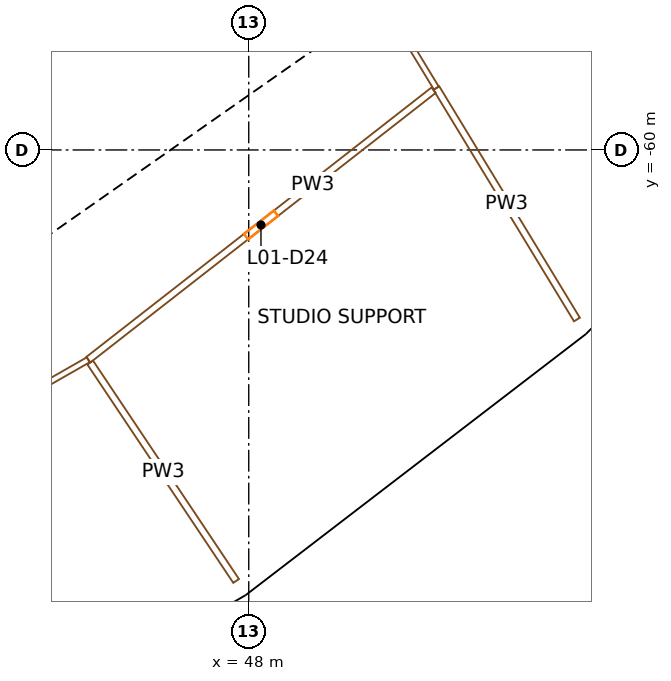
"""IFC4 building model, lengths in metres.
Left out: names, types, materials, properties, quantities, classifications, styles, units other than length and angle.
Written with IfcOpenShell. Run it as: python <this file> out.ifc"""

import sys

from ifc_helpers import new_model, si_unit, direction, frame, frame_2d, origin, origin_2d, place, context, subcontext, project, spatial, rectangle, extrude, element, fill, save


model = new_model("IFC4")
c1 = context("Model", 3, precision=1e-05, world=origin(), true_north=direction((0.0, 1.0)))
c2 = subcontext(c1, "Body", "Model", "MODEL_VIEW")
j1 = project(units=[si_unit("LENGTHUNIT", "METRE"), si_unit("PLANEANGLEUNIT", "RADIAN")], contexts=[c1])
p1 = place(None, origin())
s1 = spatial("IfcSite", under=j1, at=p1, CompositionType="ELEMENT")
p2 = place(p1, origin())
s2 = spatial("IfcBuilding", under=s1, at=p2, CompositionType="ELEMENT")
p3 = place(p2, frame((0.0, 0.0, 9.0)))
s3 = spatial("IfcBuildingStorey", under=s2, at=p3, CompositionType="ELEMENT", Elevation=9.0)
p4 = place(p3, frame((43.196, -64.647, 0.0), z_axis=(0.0, 0.0, 1.0), x_axis=(0.831469612303, 0.55557023302, 0.0)))
e1 = element("IfcColumn", 1, at=p4, inside=s3, PredefinedType="COLUMN", context=c2, shape_type="SweptSolid", body=[
    extrude(rectangle(XDim=1.4, YDim=1.8, at=origin_2d()), origin(), (0.0, 0.0, 1.0), 9.0),
])
p5 = place(p3, frame((47.362, -70.883, 0.0), z_axis=(0.0, 0.0, 1.0), x_axis=(0.831469612303, 0.55557023302, 0.0)))
e2 = element("IfcColumn", 2, at=p5, inside=s3, PredefinedType="COLUMN", context=c2, shape_type="SweptSolid", body=[
    extrude(rectangle(XDim=1.1, YDim=1.3, at=origin_2d()), origin(), (0.0, 0.0, 1.0), 9.0),
])
p6 = place(p3, frame((51.264, -58.456, 0.0), z_axis=(0.0, 0.0, 1.0), x_axis=(0.751839807479, 0.6593458151, 0.0)))
e3 = element("IfcColumn", 3, at=p6, inside=s3, PredefinedType="COLUMN", context=c2, shape_type="SweptSolid", body=[
    extrude(rectangle(XDim=1.4, YDim=1.8, at=origin_2d()), origin(), (0.0, 0.0, 1.0), 9.0),
])
p7 = place(p3, frame((56.209, -64.094, 0.0), z_axis=(0.0, 0.0, 1.0), x_axis=(0.751839807479, 0.6593458151, 0.0)))
e4 = element("IfcColumn", 4, at=p7, inside=s3, PredefinedType="COLUMN", context=c2, shape_type="SweptSolid", body=[
    extrude(rectangle(XDim=1.1, YDim=1.3, at=origin_2d()), origin(), (0.0, 0.0, 1.0), 9.0),
])
p8 = place(p3, frame((49.779, -57.191, 0.0), z_axis=(0.0, 0.0, 1.0), x_axis=(-0.573577477574, 0.819151315216, 0.0)))
e5 = element("IfcWall", 5, at=p8, inside=s3, PredefinedType="SHEAR", context=c2, shape_type="SweptSolid", body=[
    extrude(rectangle(XDim=14.8, YDim=0.9, at=frame_2d((7.4, 0.0))), origin(), (0.0, 0.0, 1.0), 8.6),
])
p9 = place(p8, frame((6.7, 0.0, 0.0)))
e6 = element("IfcOpeningElement", 6, at=p9, cuts=e5, PredefinedType="OPENING", context=c2, shape_type="SweptSolid", body=[
    extrude(rectangle(XDim=1.4, YDim=2.1, at=frame_2d((0.7, 1.05))), frame((0.0, 0.46, 0.0), z_axis=(0.0, -1.0, 0.0), x_axis=(1.0, 0.0, 0.0)), (0.0, 0.0, 1.0), 0.92),
])
p10 = place(p3, frame((36.827, -65.71, 0.0), z_axis=(0.0, 0.0, 1.0), x_axis=(0.819153391756, 0.573574511963, 0.0)))
e7 = element("IfcWall", 7, at=p10, inside=s3, PredefinedType="SHEAR", context=c2, shape_type="SweptSolid", body=[
    extrude(rectangle(XDim=15.045, YDim=0.9, at=frame_2d((7.523, 0.0))), origin(), (0.0, 0.0, 1.0), 8.6),
])
p11 = place(p10, frame((0.8, 0.0, 0.0)))
e8 = element("IfcOpeningElement", 8, at=p11, cuts=e7, PredefinedType="OPENING", context=c2, shape_type="SweptSolid", body=[
    extrude(rectangle(XDim=1.0, YDim=2.1, at=frame_2d((0.5, 1.05))), frame((0.0, 0.46, 0.0), z_axis=(0.0, -1.0, 0.0), x_axis=(1.0, 0.0, 0.0)), (0.0, 0.0, 1.0), 0.92),
])
p12 = place(p10, frame((3.475, 0.0, 0.0)))
e9 = element("IfcOpeningElement", 9, at=p12, cuts=e7, PredefinedType="OPENING", context=c2, shape_type="SweptSolid", body=[
    extrude(rectangle(XDim=1.0, YDim=2.1, at=frame_2d((0.5, 1.05))), frame((0.0, 0.46, 0.0), z_axis=(0.0, -1.0, 0.0), x_axis=(1.0, 0.0, 0.0)), (0.0, 0.0, 1.0), 0.92),
])
p13 = place(p10, frame((6.175, 0.0, 0.0)))
e10 = element("IfcOpeningElement", 10, at=p13, cuts=e7, PredefinedType="OPENING", context=c2, shape_type="SweptSolid", body=[
    extrude(rectangle(XDim=1.0, YDim=2.1, at=frame_2d((0.5, 1.05))), frame((0.0, 0.46, 0.0), z_axis=(0.0, -1.0, 0.0), x_axis=(1.0, 0.0, 0.0)), (0.0, 0.0, 1.0), 0.92),
])
p14 = place(p10, frame((13.495, 0.0, 0.0)))
e11 = element("IfcOpeningElement", 11, at=p14, cuts=e7, PredefinedType="OPENING", context=c2, shape_type="SweptSolid", body=[
    extrude(rectangle(XDim=1.1, YDim=2.1, at=frame_2d((0.55, 1.05))), frame((0.0, 0.46, 0.0), z_axis=(0.0, -1.0, 0.0), x_axis=(1.0, 0.0, 0.0)), (0.0, 0.0, 1.0), 0.92),
])
p15 = place(p3, frame((43.204, -60.696, 0.0), z_axis=(0.0, 0.0, 1.0), x_axis=(-0.573571992966, 0.819155155563, 0.0)))
e12 = element("IfcWall", 12, at=p15, inside=s3, PredefinedType="SOLIDWALL", context=c2, shape_type="SweptSolid", body=[
    extrude(rectangle(XDim=13.0, YDim=0.3, at=frame_2d((6.5, 0.0))), origin(), (0.0, 0.0, 1.0), 8.6),
])
p16 = place(p3, frame((41.262, -57.661, 0.0), z_axis=(0.0, 0.0, 1.0), x_axis=(0.819164398642, 0.573558792102, 0.0)))
e13 = element("IfcWall", 13, at=p16, inside=s3, PredefinedType="SOLIDWALL", context=c2, shape_type="SweptSolid", body=[
    extrude(rectangle(XDim=6.795, YDim=0.3, at=frame_2d((3.397, 0.0))), origin(), (0.0, 0.0, 1.0), 8.6),
])
p17 = place(p16, frame((5.32, 0.0, 0.0)))
e14 = element("IfcOpeningElement", 14, at=p17, cuts=e13, PredefinedType="OPENING", context=c2, shape_type="SweptSolid", body=[
    extrude(rectangle(XDim=1.1, YDim=2.1, at=frame_2d((0.55, 1.05))), frame((0.0, 0.16, 0.0), z_axis=(0.0, -1.0, 0.0), x_axis=(1.0, 0.0, 0.0)), (0.0, 0.0, 1.0), 0.32),
])
p18 = place(p3, frame((38.022, -77.168, 0.0), z_axis=(0.0, 0.0, 1.0), x_axis=(0.866024577697, 0.500001430823, 0.0)))
e15 = element("IfcWall", 15, at=p18, inside=s3, PredefinedType="SOLIDWALL", context=c2, shape_type="SweptSolid", body=[
    extrude(rectangle(XDim=11.312, YDim=0.45, at=frame_2d((5.656, 0.0))), origin(), (0.0, 0.0, 1.0), 7.7),
])
p19 = place(p3, frame((47.839, -71.491, 0.0), z_axis=(0.0, 0.0, 1.0), x_axis=(0.793355377778, 0.608758773695, 0.0)))
e16 = element("IfcWall", 16, at=p19, inside=s3, PredefinedType="SOLIDWALL", context=c2, shape_type="SweptSolid", body=[
    extrude(rectangle(XDim=11.135, YDim=0.45, at=frame_2d((5.567, 0.0))), origin(), (0.0, 0.0, 1.0), 7.7),
])
p20 = place(p3, frame((56.699, -64.698, 0.0), z_axis=(0.0, 0.0, 1.0), x_axis=(0.707106781187, 0.707106781187, 0.0)))
e17 = element("IfcWall", 17, at=p20, inside=s3, PredefinedType="SOLIDWALL", context=c2, shape_type="SweptSolid", body=[
    extrude(rectangle(XDim=11.312, YDim=0.45, at=frame_2d((5.656, 0.0))), origin(), (0.0, 0.0, 1.0), 7.7),
])
p21 = place(p3, frame((43.779, -65.52, 0.0), z_axis=(0.0, 0.0, 1.0), x_axis=(-0.868109106225, -0.496373427663, 0.0)))
e18 = element("IfcWall", 18, at=p21, inside=s3, PredefinedType="PARTITIONING", context=c2, shape_type="SweptSolid", body=[
    extrude(rectangle(XDim=10.875, YDim=0.15, at=frame_2d((5.438, 0.0))), origin(), (0.0, 0.0, 1.0), 7.6),
])
p22 = place(p21, frame((4.938, 0.0, 0.0)))
e19 = element("IfcOpeningElement", 19, at=p22, cuts=e18, PredefinedType="OPENING", context=c2, shape_type="SweptSolid", body=[
    extrude(rectangle(XDim=1.0, YDim=2.1, at=frame_2d((0.5, 1.05))), frame((0.0, 0.085, 0.0), z_axis=(0.0, -1.0, 0.0), x_axis=(1.0, 0.0, 0.0)), (0.0, 0.0, 1.0), 0.17),
])
p23 = place(p3, frame((52.865, -58.427, 0.0), z_axis=(0.0, 0.0, 1.0), x_axis=(-0.788252635542, -0.615351755146, 0.0)))
e20 = element("IfcWall", 20, at=p23, inside=s3, PredefinedType="PARTITIONING", context=c2, shape_type="SweptSolid", body=[
    extrude(rectangle(XDim=11.526, YDim=0.18, at=frame_2d((5.763, 0.0))), origin(), (0.0, 0.0, 1.0), 7.6),
])
p24 = place(p23, frame((5.263, 0.0, 0.0)))
e21 = element("IfcOpeningElement", 21, at=p24, cuts=e20, PredefinedType="OPENING", context=c2, shape_type="SweptSolid", body=[
    extrude(rectangle(XDim=1.0, YDim=2.1, at=frame_2d((0.5, 1.05))), frame((0.0, 0.1, 0.0), z_axis=(0.0, -1.0, 0.0), x_axis=(1.0, 0.0, 0.0)), (0.0, 0.0, 1.0), 0.2),
])
p25 = place(p3, frame((47.668, -71.34, 0.0), z_axis=(0.0, 0.0, 1.0), x_axis=(-0.555588604147, 0.831457336814, 0.0)))
e22 = element("IfcWall", 22, at=p25, inside=s3, PredefinedType="PARTITIONING", context=c2, shape_type="SweptSolid", body=[
    extrude(rectangle(XDim=6.91, YDim=0.18, at=frame_2d((3.455, 0.0))), origin(), (0.0, 0.0, 1.0), 7.6),
])
p26 = place(p3, frame((48.87, -51.679, 0.0), z_axis=(0.0, 0.0, 1.0), x_axis=(0.519169312849, -0.854671413232, 0.0)))
e23 = element("IfcWall", 23, at=p26, inside=s3, PredefinedType="PARTITIONING", context=c2, shape_type="SweptSolid", body=[
    extrude(rectangle(XDim=7.831, YDim=0.15, at=frame_2d((3.915, 0.0))), origin(), (0.0, 0.0, 1.0), 7.6),
])
p27 = place(p3, frame((52.936, -58.372, 0.0), z_axis=(0.0, 0.0, 1.0), x_axis=(0.519148894699, -0.854683815883, 0.0)))
e24 = element("IfcWall", 24, at=p27, inside=s3, PredefinedType="PARTITIONING", context=c2, shape_type="SweptSolid", body=[
    extrude(rectangle(XDim=7.125, YDim=0.18, at=frame_2d((3.563, 0.0))), origin(), (0.0, 0.0, 1.0), 7.6),
])
p28 = place(p14, origin())
e25 = element("IfcDoor", 25, at=p28, inside=s3, OperationType="SINGLE_SWING_LEFT", PredefinedType="DOOR", context=c2, shape_type="SweptSolid", body=[
    extrude(rectangle(XDim=1.1, YDim=2.1, at=frame_2d((0.55, 1.05))), frame((0.0, 0.025, 0.0), z_axis=(0.0, -1.0, 0.0), x_axis=(1.0, 0.0, 0.0)), (0.0, 0.0, 1.0), 0.05),
])
fill(e11, e25)
p29 = place(p24, origin())
e26 = element("IfcDoor", 26, at=p29, inside=s3, OperationType="SINGLE_SWING_RIGHT", PredefinedType="DOOR", context=c2, shape_type="SweptSolid", body=[
    extrude(rectangle(XDim=1.0, YDim=2.1, at=frame_2d((0.5, 1.05))), frame((0.0, 0.025, 0.0), z_axis=(0.0, -1.0, 0.0), x_axis=(1.0, 0.0, 0.0)), (0.0, 0.0, 1.0), 0.05),
])
fill(e21, e26)
save(model, sys.argv[1])
